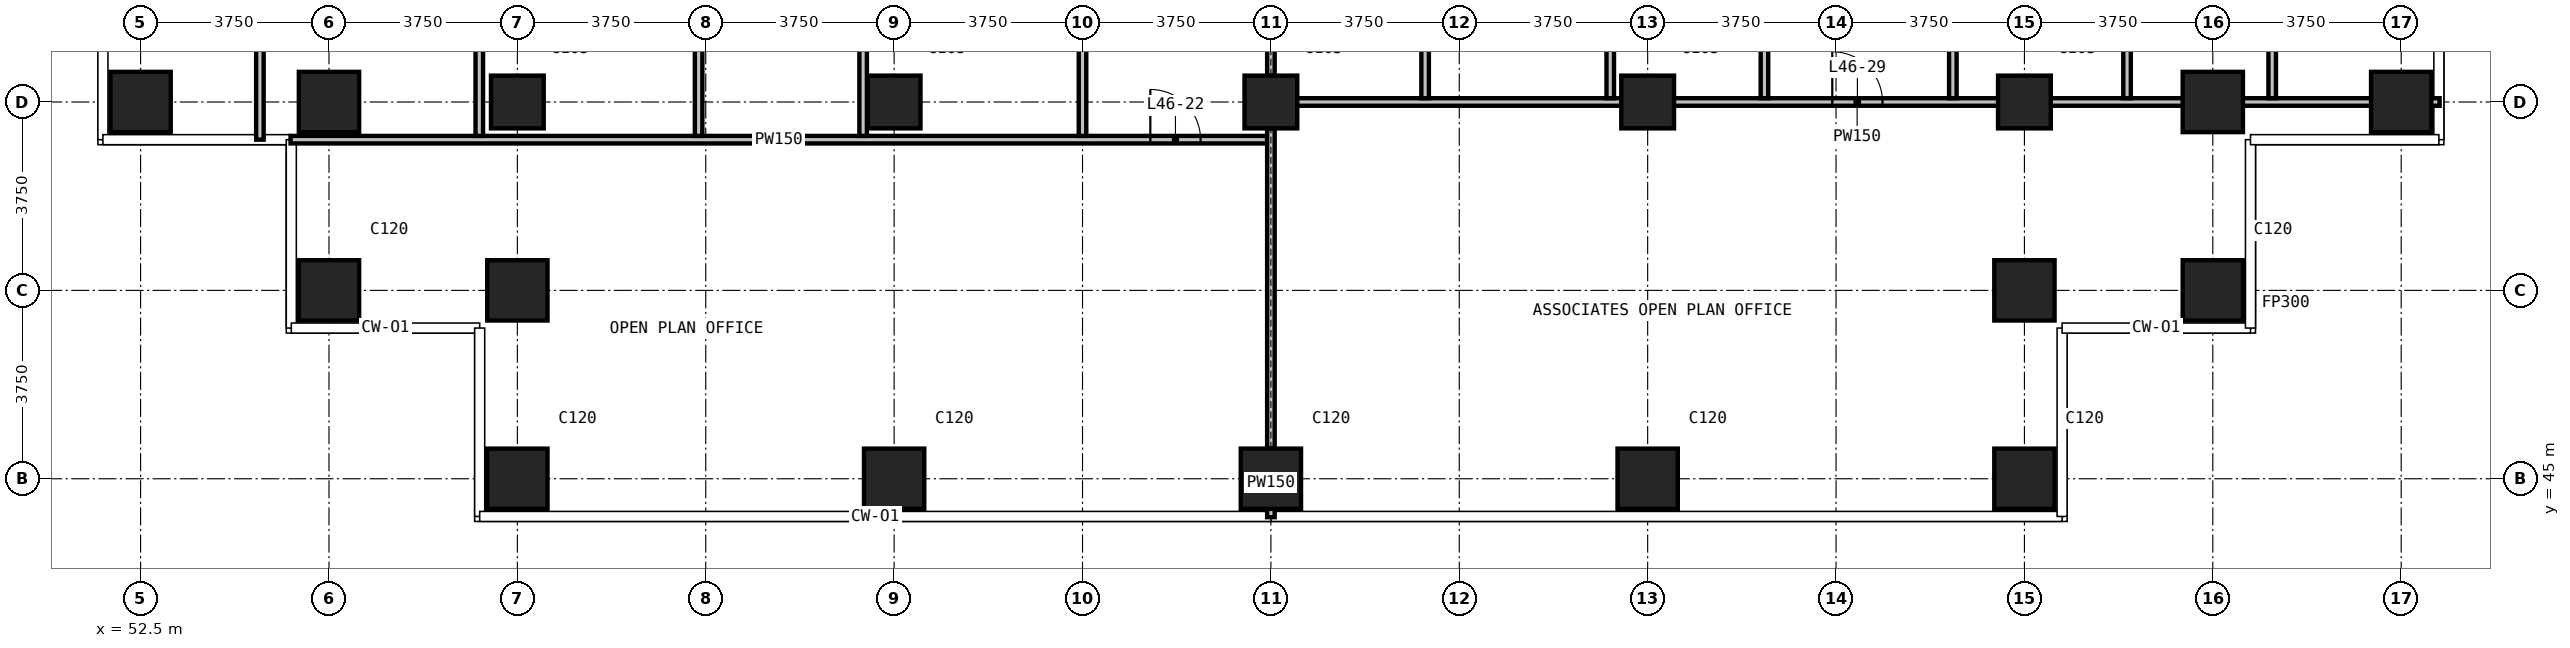
"""IFC4 building model, lengths in metres.
Left out: names, types, materials, properties, quantities, classifications, styles, units other than length and angle.
Written with IfcOpenShell. Run it as: python <this file> out.ifc"""

import sys

from ifc_helpers import new_model, si_unit, direction, frame, frame_2d, origin, origin_2d, place, context, subcontext, project, spatial, rectangle, extrude, element, fill, save


model = new_model("IFC4")
c1 = context("Model", 3, precision=1e-05, world=origin(), true_north=direction((0.0, 1.0)))
c2 = subcontext(c1, "Body", "Model", "MODEL_VIEW")
j1 = project(units=[si_unit("LENGTHUNIT", "METRE"), si_unit("PLANEANGLEUNIT", "RADIAN")], contexts=[c1])
p1 = place(None, origin())
s1 = spatial("IfcSite", under=j1, at=p1, CompositionType="ELEMENT")
p2 = place(p1, origin())
s2 = spatial("IfcBuilding", under=s1, at=p2, CompositionType="ELEMENT")
p3 = place(p2, frame((0.0, 0.0, 180.1)))
s3 = spatial("IfcBuildingStorey", under=s2, at=p3, CompositionType="ELEMENT", Elevation=180.1)
for number, where, z_axis, x_axis in (
    (1, (52.5, 52.5, 0.0), (0.0, 0.0, 1.0), (1.0, 0.0, 0.0)),
    (2, (56.25, 48.75, 0.0), (0.0, 0.0, 1.0), (1.0, 0.0, 0.0)),
    (3, (56.25, 52.5, 0.0), (0.0, 0.0, 1.0), (1.0, 0.0, 0.0)),
    (4, (60.0, 45.0, 0.0), (0.0, 0.0, 1.0), (1.0, 0.0, 0.0)),
    (5, (60.0, 48.75, 0.0), (0.0, 0.0, 1.0), (1.0, 0.0, 0.0)),
):
    element("IfcColumn", number, at=place(p3, frame(where, z_axis=z_axis, x_axis=x_axis)), inside=s3, PredefinedType="COLUMN", context=c2, shape_type="SweptSolid", body=[
        extrude(rectangle(XDim=1.2, YDim=1.2, at=origin_2d()), origin(), (0.0, 0.0, 1.0), 3.6),
    ])
p4 = place(p3, frame((60.0, 52.5, 0.0), z_axis=(0.0, 0.0, 1.0), x_axis=(1.0, 0.0, 0.0)))
e6 = element("IfcColumn", 6, at=p4, inside=s3, PredefinedType="COLUMN", context=c2, shape_type="SweptSolid", body=[
    extrude(rectangle(XDim=1.05, YDim=1.05, at=origin_2d()), origin(), (0.0, 0.0, 1.0), 3.6),
])
p5 = place(p3, frame((67.5, 45.0, 0.0), z_axis=(0.0, 0.0, 1.0), x_axis=(1.0, 0.0, 0.0)))
e7 = element("IfcColumn", 7, at=p5, inside=s3, PredefinedType="COLUMN", context=c2, shape_type="SweptSolid", body=[
    extrude(rectangle(XDim=1.2, YDim=1.2, at=origin_2d()), origin(), (0.0, 0.0, 1.0), 3.6),
])
p6 = place(p3, frame((67.5, 52.5, 0.0), z_axis=(0.0, 0.0, 1.0), x_axis=(1.0, 0.0, 0.0)))
e8 = element("IfcColumn", 8, at=p6, inside=s3, PredefinedType="COLUMN", context=c2, shape_type="SweptSolid", body=[
    extrude(rectangle(XDim=1.05, YDim=1.05, at=origin_2d()), origin(), (0.0, 0.0, 1.0), 3.6),
])
p7 = place(p3, frame((75.0, 45.0, 0.0), z_axis=(0.0, 0.0, 1.0), x_axis=(1.0, 0.0, 0.0)))
e9 = element("IfcColumn", 9, at=p7, inside=s3, PredefinedType="COLUMN", context=c2, shape_type="SweptSolid", body=[
    extrude(rectangle(XDim=1.2, YDim=1.2, at=origin_2d()), origin(), (0.0, 0.0, 1.0), 3.6),
])
p8 = place(p3, frame((75.0, 52.5, 0.0), z_axis=(0.0, 0.0, 1.0), x_axis=(1.0, 0.0, 0.0)))
e10 = element("IfcColumn", 10, at=p8, inside=s3, PredefinedType="COLUMN", context=c2, shape_type="SweptSolid", body=[
    extrude(rectangle(XDim=1.05, YDim=1.05, at=origin_2d()), origin(), (0.0, 0.0, 1.0), 3.6),
])
p9 = place(p3, frame((82.5, 45.0, 0.0), z_axis=(0.0, 0.0, 1.0), x_axis=(1.0, 0.0, 0.0)))
e11 = element("IfcColumn", 11, at=p9, inside=s3, PredefinedType="COLUMN", context=c2, shape_type="SweptSolid", body=[
    extrude(rectangle(XDim=1.2, YDim=1.2, at=origin_2d()), origin(), (0.0, 0.0, 1.0), 3.6),
])
p10 = place(p3, frame((82.5, 52.5, 0.0), z_axis=(0.0, 0.0, 1.0), x_axis=(1.0, 0.0, 0.0)))
e12 = element("IfcColumn", 12, at=p10, inside=s3, PredefinedType="COLUMN", context=c2, shape_type="SweptSolid", body=[
    extrude(rectangle(XDim=1.05, YDim=1.05, at=origin_2d()), origin(), (0.0, 0.0, 1.0), 3.6),
])
for number, where, z_axis, x_axis in (
    (13, (90.0, 45.0, 0.0), (0.0, 0.0, 1.0), (1.0, 0.0, 0.0)),
    (14, (90.0, 48.75, 0.0), (0.0, 0.0, 1.0), (1.0, 0.0, 0.0)),
):
    element("IfcColumn", number, at=place(p3, frame(where, z_axis=z_axis, x_axis=x_axis)), inside=s3, PredefinedType="COLUMN", context=c2, shape_type="SweptSolid", body=[
        extrude(rectangle(XDim=1.2, YDim=1.2, at=origin_2d()), origin(), (0.0, 0.0, 1.0), 3.6),
    ])
p11 = place(p3, frame((90.0, 52.5, 0.0), z_axis=(0.0, 0.0, 1.0), x_axis=(1.0, 0.0, 0.0)))
e15 = element("IfcColumn", 15, at=p11, inside=s3, PredefinedType="COLUMN", context=c2, shape_type="SweptSolid", body=[
    extrude(rectangle(XDim=1.05, YDim=1.05, at=origin_2d()), origin(), (0.0, 0.0, 1.0), 3.6),
])
for number, where, z_axis, x_axis in (
    (16, (93.75, 48.75, 0.0), (0.0, 0.0, 1.0), (1.0, 0.0, 0.0)),
    (17, (93.75, 52.5, 0.0), (0.0, 0.0, 1.0), (1.0, 0.0, 0.0)),
    (18, (97.5, 52.5, 0.0), (0.0, 0.0, 1.0), (1.0, 0.0, 0.0)),
):
    element("IfcColumn", number, at=place(p3, frame(where, z_axis=z_axis, x_axis=x_axis)), inside=s3, PredefinedType="COLUMN", context=c2, shape_type="SweptSolid", body=[
        extrude(rectangle(XDim=1.2, YDim=1.2, at=origin_2d()), origin(), (0.0, 0.0, 1.0), 3.6),
    ])
p12 = place(p3, frame((55.485, 51.75, 0.0), z_axis=(0.0, 0.0, 1.0), x_axis=(1.0, 0.0, 0.0)))
e19 = element("IfcWall", 19, at=p12, inside=s3, PredefinedType="PARTITIONING", context=c2, shape_type="SweptSolid", body=[
    extrude(rectangle(XDim=19.44, YDim=0.15, at=frame_2d((9.72, 0.0))), origin(), (0.0, 0.0, 1.0), 3.25),
])
p13 = place(p12, frame((17.115, 0.0, 0.0)))
e20 = element("IfcOpeningElement", 20, at=p13, cuts=e19, PredefinedType="OPENING", context=c2, shape_type="SweptSolid", body=[
    extrude(rectangle(XDim=1.0, YDim=2.2, at=frame_2d((0.5, 1.1))), frame((0.0, 0.085, 0.0), z_axis=(0.0, -1.0, 0.0), x_axis=(1.0, 0.0, 0.0)), (0.0, 0.0, 1.0), 0.17),
])
p14 = place(p3, frame((75.075, 52.5, 0.0), z_axis=(0.0, 0.0, 1.0), x_axis=(1.0, 0.0, 0.0)))
e21 = element("IfcWall", 21, at=p14, inside=s3, PredefinedType="PARTITIONING", context=c2, shape_type="SweptSolid", body=[
    extrude(rectangle(XDim=23.19, YDim=0.15, at=frame_2d((11.595, 0.0))), origin(), (0.0, 0.0, 1.0), 3.25),
])
p15 = place(p14, frame((11.1, 0.0, 0.0)))
e22 = element("IfcOpeningElement", 22, at=p15, cuts=e21, PredefinedType="OPENING", context=c2, shape_type="SweptSolid", body=[
    extrude(rectangle(XDim=1.0, YDim=2.2, at=frame_2d((0.5, 1.1))), frame((0.0, 0.085, 0.0), z_axis=(0.0, -1.0, 0.0), x_axis=(1.0, 0.0, 0.0)), (0.0, 0.0, 1.0), 0.17),
])
p16 = place(p3, frame((54.875, 51.75, 0.0), z_axis=(0.0, 0.0, 1.0), x_axis=(0.0, 1.0, 0.0)))
e23 = element("IfcWall", 23, at=p16, inside=s3, PredefinedType="PARTITIONING", context=c2, shape_type="SweptSolid", body=[
    extrude(rectangle(XDim=5.15, YDim=0.15, at=frame_2d((2.575, 0.0))), origin(), (0.0, 0.0, 1.0), 3.25),
])
for number, where, z_axis, x_axis in (
    (24, (59.242, 51.825, 0.0), (0.0, 0.0, 1.0), (0.0, 1.0, 0.0)),
    (25, (63.608, 51.825, 0.0), (0.0, 0.0, 1.0), (0.0, 1.0, 0.0)),
    (26, (66.883, 51.825, 0.0), (0.0, 0.0, 1.0), (0.0, 1.0, 0.0)),
    (27, (71.25, 51.825, 0.0), (0.0, 0.0, 1.0), (0.0, 1.0, 0.0)),
):
    element("IfcWall", number, at=place(p3, frame(where, z_axis=z_axis, x_axis=x_axis)), inside=s3, PredefinedType="PARTITIONING", context=c2, shape_type="SweptSolid", body=[
        extrude(rectangle(XDim=5.075, YDim=0.15, at=frame_2d((2.538, 0.0))), origin(), (0.0, 0.0, 1.0), 3.25),
    ])
p17 = place(p3, frame((75.0, 44.235, 0.0), z_axis=(0.0, 0.0, 1.0), x_axis=(0.0, 1.0, 0.0)))
e28 = element("IfcWall", 28, at=p17, inside=s3, PredefinedType="PARTITIONING", context=c2, shape_type="SweptSolid", body=[
    extrude(rectangle(XDim=1.365, YDim=0.15, at=frame_2d((0.683, 0.0))), origin(), (0.0, 0.0, 1.0), 3.25),
])
p18 = place(p3, frame((75.0, 45.6, 0.0), z_axis=(0.0, 0.0, 1.0), x_axis=(0.0, 1.0, 0.0)))
e29 = element("IfcWall", 29, at=p18, inside=s3, PredefinedType="PARTITIONING", context=c2, shape_type="SweptSolid", body=[
    extrude(rectangle(XDim=6.376, YDim=0.15, at=frame_2d((3.188, 0.0))), origin(), (0.0, 0.0, 1.0), 2.35),
])
p19 = place(p3, frame((75.0, 51.976, 0.0), z_axis=(0.0, 0.0, 1.0), x_axis=(0.0, 1.0, 0.0)))
e30 = element("IfcWall", 30, at=p19, inside=s3, PredefinedType="PARTITIONING", context=c2, shape_type="SweptSolid", body=[
    extrude(rectangle(XDim=1.049, YDim=0.15, at=frame_2d((0.524, 0.0))), origin(), (0.0, 0.0, 1.0), 3.25),
])
p20 = place(p3, frame((75.0, 53.025, 0.0), z_axis=(0.0, 0.0, 1.0), x_axis=(0.0, 1.0, 0.0)))
e31 = element("IfcWall", 31, at=p20, inside=s3, PredefinedType="PARTITIONING", context=c2, shape_type="SweptSolid", body=[
    extrude(rectangle(XDim=3.875, YDim=0.15, at=frame_2d((1.938, 0.0))), origin(), (0.0, 0.0, 1.0), 2.35),
])
for number, where, z_axis, x_axis in (
    (32, (78.07, 52.575, 0.0), (0.0, 0.0, 1.0), (0.0, 1.0, 0.0)),
    (33, (81.755, 52.575, 0.0), (0.0, 0.0, 1.0), (0.0, 1.0, 0.0)),
    (34, (84.825, 52.575, 0.0), (0.0, 0.0, 1.0), (0.0, 1.0, 0.0)),
    (35, (88.575, 52.575, 0.0), (0.0, 0.0, 1.0), (0.0, 1.0, 0.0)),
    (36, (92.043, 52.575, 0.0), (0.0, 0.0, 1.0), (0.0, 1.0, 0.0)),
    (37, (94.932, 52.575, 0.0), (0.0, 0.0, 1.0), (0.0, 1.0, 0.0)),
):
    element("IfcWall", number, at=place(p3, frame(where, z_axis=z_axis, x_axis=x_axis)), inside=s3, PredefinedType="PARTITIONING", context=c2, shape_type="SweptSolid", body=[
        extrude(rectangle(XDim=4.325, YDim=0.15, at=frame_2d((2.163, 0.0))), origin(), (0.0, 0.0, 1.0), 3.25),
    ])
p21 = place(p13, origin())
e38 = element("IfcDoor", 38, at=p21, inside=s3, OperationType="SINGLE_SWING_LEFT", PredefinedType="DOOR", context=c2, shape_type="SweptSolid", body=[
    extrude(rectangle(XDim=1.0, YDim=2.2, at=frame_2d((0.5, 1.1))), frame((0.0, 0.025, 0.0), z_axis=(0.0, -1.0, 0.0), x_axis=(1.0, 0.0, 0.0)), (0.0, 0.0, 1.0), 0.05),
])
fill(e20, e38)
p22 = place(p15, origin())
e39 = element("IfcDoor", 39, at=p22, inside=s3, OperationType="SINGLE_SWING_LEFT", PredefinedType="DOOR", context=c2, shape_type="SweptSolid", body=[
    extrude(rectangle(XDim=1.0, YDim=2.2, at=frame_2d((0.5, 1.1))), frame((0.0, 0.025, 0.0), z_axis=(0.0, -1.0, 0.0), x_axis=(1.0, 0.0, 0.0)), (0.0, 0.0, 1.0), 0.05),
])
fill(e22, e39)
save(model, sys.argv[1])
